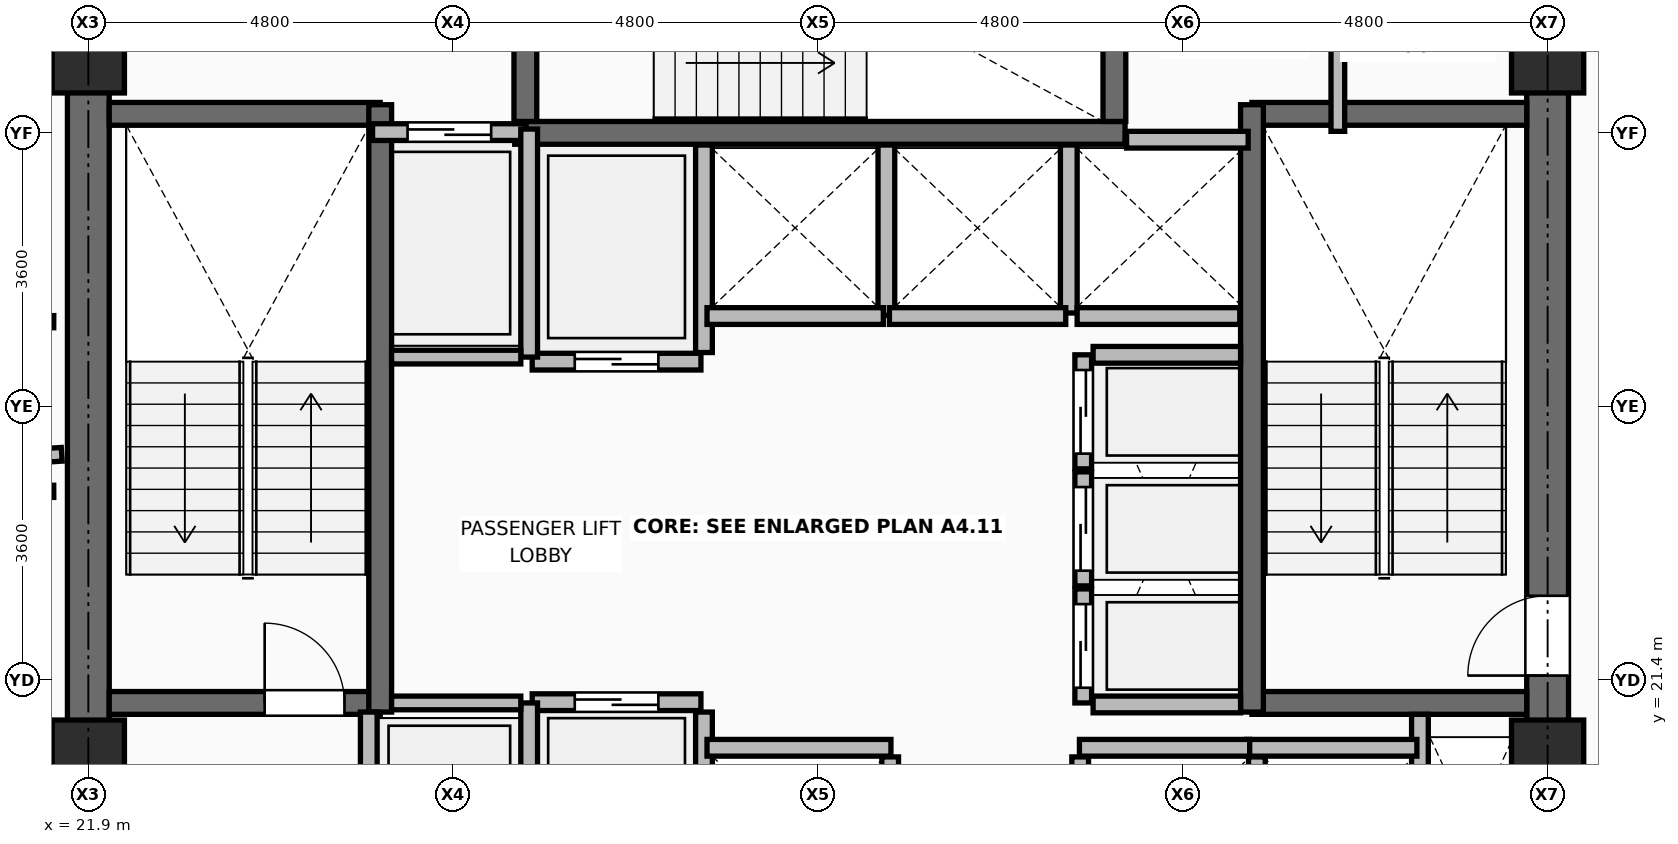
"""IFC4 building model, lengths in metres.
Left out: names, types, materials, properties, quantities, classifications, styles, units other than length and angle.
Written with IfcOpenShell. Run it as: python <this file> out.ifc"""

import sys

from ifc_helpers import new_model, si_unit, direction, frame, frame_2d, origin, origin_2d, place, context, subcontext, project, spatial, rectangle, extrude, element, fill, save


model = new_model("IFC4")
c1 = context("Model", 3, precision=1e-05, world=origin(), true_north=direction((0.0, 1.0)))
c2 = subcontext(c1, "Body", "Model", "MODEL_VIEW")
j1 = project(units=[si_unit("LENGTHUNIT", "METRE"), si_unit("PLANEANGLEUNIT", "RADIAN")], contexts=[c1])
p1 = place(None, origin())
s1 = spatial("IfcSite", under=j1, at=p1, CompositionType="ELEMENT")
p2 = place(p1, origin())
s2 = spatial("IfcBuilding", under=s1, at=p2, CompositionType="ELEMENT")
p3 = place(p2, frame((0.0, 0.0, 153.45)))
s3 = spatial("IfcBuildingStorey", under=s2, at=p3, CompositionType="ELEMENT", Elevation=153.45)
for number, where, z_axis, x_axis in (
    (1, (21.9, 20.4, 0.0), (0.0, 0.0, 1.0), (1.0, 0.0, 0.0)),
    (2, (21.9, 29.6, 0.0), (0.0, 0.0, 1.0), (1.0, 0.0, 0.0)),
    (3, (41.1, 20.4, 0.0), (0.0, 0.0, 1.0), (1.0, 0.0, 0.0)),
    (4, (41.1, 29.6, 0.0), (0.0, 0.0, 1.0), (1.0, 0.0, 0.0)),
):
    element("IfcColumn", number, at=place(p3, frame(where, z_axis=z_axis, x_axis=x_axis)), inside=s3, PredefinedType="COLUMN", context=c2, shape_type="SweptSolid", body=[
        extrude(rectangle(XDim=0.95, YDim=0.95, at=origin_2d()), origin(), (0.0, 0.0, 1.0), 3.75),
    ])
p4 = place(p3, frame((30.0, 18.08, 0.0), z_axis=(0.0, 0.0, 1.0), x_axis=(0.0, 1.0, 0.0)))
e5 = element("IfcWall", 5, at=p4, inside=s3, PredefinedType="PARTITIONING", context=c2, shape_type="SweptSolid", body=[
    extrude(rectangle(XDim=2.9, YDim=0.22, at=frame_2d((1.45, 0.0))), origin(), (0.0, 0.0, 1.0), 3.545),
])
for number, where, z_axis, x_axis in (
    (6, (32.45, 17.92, 0.0), (0.0, 0.0, 1.0), (0.0, 1.0, 0.0)),
    (7, (34.95, 17.92, 0.0), (0.0, 0.0, 1.0), (0.0, 1.0, 0.0)),
):
    element("IfcWall", number, at=place(p3, frame(where, z_axis=z_axis, x_axis=x_axis)), inside=s3, PredefinedType="PARTITIONING", context=c2, shape_type="SweptSolid", body=[
        extrude(rectangle(XDim=2.47, YDim=0.22, at=frame_2d((1.235, 0.0))), origin(), (0.0, 0.0, 1.0), 3.006),
    ])
p5 = place(p3, frame((37.275, 18.08, 0.0), z_axis=(0.0, 0.0, 1.0), x_axis=(0.0, 1.0, 0.0)))
e8 = element("IfcWall", 8, at=p5, inside=s3, PredefinedType="PARTITIONING", context=c2, shape_type="SweptSolid", body=[
    extrude(rectangle(XDim=2.31, YDim=0.22, at=frame_2d((1.155, 0.0))), origin(), (0.0, 0.0, 1.0), 3.545),
])
p6 = place(p3, frame((30.0, 25.71, 0.0), z_axis=(0.0, 0.0, 1.0), x_axis=(0.0, 1.0, 0.0)))
e9 = element("IfcWall", 9, at=p6, inside=s3, PredefinedType="PARTITIONING", context=c2, shape_type="SweptSolid", body=[
    extrude(rectangle(XDim=2.73, YDim=0.22, at=frame_2d((1.365, 0.0))), origin(), (0.0, 0.0, 1.0), 3.545),
])
p7 = place(p3, frame((32.4, 26.2, 0.0), z_axis=(0.0, 0.0, 1.0), x_axis=(0.0, 1.0, 0.0)))
e10 = element("IfcWall", 10, at=p7, inside=s3, PredefinedType="PARTITIONING", context=c2, shape_type="SweptSolid", body=[
    extrude(rectangle(XDim=2.24, YDim=0.22, at=frame_2d((1.12, 0.0))), origin(), (0.0, 0.0, 1.0), 3.545),
])
p8 = place(p3, frame((34.8, 26.23, 0.0), z_axis=(0.0, 0.0, 1.0), x_axis=(0.0, 1.0, 0.0)))
e11 = element("IfcWall", 11, at=p8, inside=s3, PredefinedType="PARTITIONING", context=c2, shape_type="SweptSolid", body=[
    extrude(rectangle(XDim=2.21, YDim=0.22, at=frame_2d((1.105, 0.0))), origin(), (0.0, 0.0, 1.0), 3.545),
])
p9 = place(p3, frame((34.91, 26.19, 0.0), z_axis=(0.0, 0.0, 1.0), x_axis=(1.0, 0.0, 0.0)))
e12 = element("IfcWall", 12, at=p9, inside=s3, PredefinedType="PARTITIONING", context=c2, shape_type="SweptSolid", body=[
    extrude(rectangle(XDim=2.14, YDim=0.22, at=frame_2d((1.07, 0.0))), origin(), (0.0, 0.0, 1.0), 3.545),
])
p10 = place(p3, frame((21.9, 18.075, 0.0), z_axis=(0.0, 0.0, 1.0), x_axis=(0.0, 1.0, 0.0)))
e13 = element("IfcWall", 13, at=p10, inside=s3, PredefinedType="SHEAR", context=c2, shape_type="SweptSolid", body=[
    extrude(rectangle(XDim=14.1, YDim=0.55, at=frame_2d((7.05, 0.0))), origin(), (0.0, 0.0, 1.0), 3.57),
])
p11 = place(p3, frame((41.1, 18.075, 0.0), z_axis=(0.0, 0.0, 1.0), x_axis=(0.0, 1.0, 0.0)))
e14 = element("IfcWall", 14, at=p11, inside=s3, PredefinedType="SHEAR", context=c2, shape_type="SweptSolid", body=[
    extrude(rectangle(XDim=14.1, YDim=0.55, at=frame_2d((7.05, 0.0))), origin(), (0.0, 0.0, 1.0), 3.57),
])
p12 = place(p11, frame((3.385, 0.0, 0.0)))
e15 = element("IfcOpeningElement", 15, at=p12, cuts=e14, PredefinedType="OPENING", context=c2, shape_type="SweptSolid", body=[
    extrude(rectangle(XDim=1.05, YDim=2.1, at=frame_2d((0.525, 1.05))), frame((0.0, 0.285, 0.0), z_axis=(0.0, -1.0, 0.0), x_axis=(1.0, 0.0, 0.0)), (0.0, 0.0, 1.0), 0.57),
])
p13 = place(p3, frame((22.175, 21.1, 0.0), z_axis=(0.0, 0.0, 1.0), x_axis=(1.0, 0.0, 0.0)))
e16 = element("IfcWall", 16, at=p13, inside=s3, PredefinedType="SHEAR", context=c2, shape_type="SweptSolid", body=[
    extrude(rectangle(XDim=3.565, YDim=0.3, at=frame_2d((1.782, 0.0))), origin(), (0.0, 0.0, 1.0), 3.57),
])
p14 = place(p13, frame((2.045, 0.0, 0.0)))
e17 = element("IfcOpeningElement", 17, at=p14, cuts=e16, PredefinedType="OPENING", context=c2, shape_type="SweptSolid", body=[
    extrude(rectangle(XDim=1.05, YDim=2.1, at=frame_2d((0.525, 1.05))), frame((0.0, 0.16, 0.0), z_axis=(0.0, -1.0, 0.0), x_axis=(1.0, 0.0, 0.0)), (0.0, 0.0, 1.0), 0.32),
])
p15 = place(p3, frame((22.175, 28.85, 0.0), z_axis=(0.0, 0.0, 1.0), x_axis=(1.0, 0.0, 0.0)))
e18 = element("IfcWall", 18, at=p15, inside=s3, PredefinedType="SHEAR", context=c2, shape_type="SweptSolid", body=[
    extrude(rectangle(XDim=3.565, YDim=0.3, at=frame_2d((1.782, 0.0))), origin(), (0.0, 0.0, 1.0), 3.57),
])
p16 = place(p3, frame((25.74, 20.98, 0.0), z_axis=(0.0, 0.0, 1.0), x_axis=(0.0, 1.0, 0.0)))
e19 = element("IfcWall", 19, at=p16, inside=s3, PredefinedType="SHEAR", context=c2, shape_type="SweptSolid", body=[
    extrude(rectangle(XDim=7.99, YDim=0.3, at=frame_2d((3.995, 0.0))), origin(), (0.0, 0.0, 1.0), 3.57),
])
for number, where, z_axis, x_axis in (
    (20, (37.21, 21.1, 0.0), (0.0, 0.0, 1.0), (1.0, 0.0, 0.0)),
    (21, (37.21, 28.85, 0.0), (0.0, 0.0, 1.0), (1.0, 0.0, 0.0)),
):
    element("IfcWall", number, at=place(p3, frame(where, z_axis=z_axis, x_axis=x_axis)), inside=s3, PredefinedType="SHEAR", context=c2, shape_type="SweptSolid", body=[
        extrude(rectangle(XDim=3.615, YDim=0.3, at=frame_2d((1.808, 0.0))), origin(), (0.0, 0.0, 1.0), 3.57),
    ])
p17 = place(p3, frame((37.21, 20.98, 0.0), z_axis=(0.0, 0.0, 1.0), x_axis=(0.0, 1.0, 0.0)))
e22 = element("IfcWall", 22, at=p17, inside=s3, PredefinedType="SHEAR", context=c2, shape_type="SweptSolid", body=[
    extrude(rectangle(XDim=7.99, YDim=0.3, at=frame_2d((3.995, 0.0))), origin(), (0.0, 0.0, 1.0), 3.57),
])
p18 = place(p3, frame((27.51, 28.6, 0.0), z_axis=(0.0, 0.0, 1.0), x_axis=(1.0, 0.0, 0.0)))
e23 = element("IfcWall", 23, at=p18, inside=s3, PredefinedType="SHEAR", context=c2, shape_type="SweptSolid", body=[
    extrude(rectangle(XDim=8.03, YDim=0.3, at=frame_2d((4.015, 0.0))), origin(), (0.0, 0.0, 1.0), 3.57),
])
p19 = place(p3, frame((27.65, 28.75, 0.0), z_axis=(0.0, 0.0, 1.0), x_axis=(0.0, 1.0, 0.0)))
e24 = element("IfcWall", 24, at=p19, inside=s3, PredefinedType="SHEAR", context=c2, shape_type="SweptSolid", body=[
    extrude(rectangle(XDim=3.425, YDim=0.3, at=frame_2d((1.712, 0.0))), origin(), (0.0, 0.0, 1.0), 3.57),
])
p20 = place(p19, frame((1.0, 0.0, 0.0)))
e25 = element("IfcOpeningElement", 25, at=p20, cuts=e24, PredefinedType="OPENING", context=c2, shape_type="SweptSolid", body=[
    extrude(rectangle(XDim=1.05, YDim=2.1, at=frame_2d((0.525, 1.05))), frame((0.0, 0.16, 0.0), z_axis=(0.0, -1.0, 0.0), x_axis=(1.0, 0.0, 0.0)), (0.0, 0.0, 1.0), 0.32),
])
p21 = place(p3, frame((35.4, 28.75, 0.0), z_axis=(0.0, 0.0, 1.0), x_axis=(0.0, 1.0, 0.0)))
e26 = element("IfcWall", 26, at=p21, inside=s3, PredefinedType="SHEAR", context=c2, shape_type="SweptSolid", body=[
    extrude(rectangle(XDim=3.425, YDim=0.3, at=frame_2d((1.712, 0.0))), origin(), (0.0, 0.0, 1.0), 3.57),
])
p22 = place(p3, frame((39.42, 18.075, 0.0), z_axis=(0.0, 0.0, 1.0), x_axis=(0.0, 1.0, 0.0)))
e27 = element("IfcWall", 27, at=p22, inside=s3, PredefinedType="PARTITIONING", context=c2, shape_type="SweptSolid", body=[
    extrude(rectangle(XDim=2.875, YDim=0.22, at=frame_2d((1.438, 0.0))), origin(), (0.0, 0.0, 1.0), 3.55),
])
p23 = place(p3, frame((25.59, 18.22, 0.0), z_axis=(0.0, 0.0, 1.0), x_axis=(0.0, 1.0, 0.0)))
e28 = element("IfcWall", 28, at=p23, inside=s3, PredefinedType="PARTITIONING", context=c2, shape_type="SweptSolid", body=[
    extrude(rectangle(XDim=2.76, YDim=0.22, at=frame_2d((1.38, 0.0))), origin(), (0.0, 0.0, 1.0), 3.55),
])
p24 = place(p23, frame((0.83, 0.0, 0.0)))
e29 = element("IfcOpeningElement", 29, at=p24, cuts=e28, PredefinedType="OPENING", context=c2, shape_type="SweptSolid", body=[
    extrude(rectangle(XDim=1.1, YDim=2.2, at=frame_2d((0.55, 1.1))), frame((0.0, 0.12, 0.0), z_axis=(0.0, -1.0, 0.0), x_axis=(1.0, 0.0, 0.0)), (0.0, 0.0, 1.0), 0.24),
])
p25 = place(p3, frame((25.64, 28.61, 0.0), z_axis=(0.0, 0.0, 1.0), x_axis=(1.0, 0.0, 0.0)))
e30 = element("IfcWall", 30, at=p25, inside=s3, PredefinedType="PARTITIONING", context=c2, shape_type="SweptSolid", body=[
    extrude(rectangle(XDim=2.02, YDim=0.22, at=frame_2d((1.01, 0.0))), origin(), (0.0, 0.0, 1.0), 3.55),
])
p26 = place(p25, frame((0.46, 0.0, 0.0)))
e31 = element("IfcOpeningElement", 31, at=p26, cuts=e30, PredefinedType="OPENING", context=c2, shape_type="SweptSolid", body=[
    extrude(rectangle(XDim=1.1, YDim=2.2, at=frame_2d((0.55, 1.1))), frame((0.0, 0.12, 0.0), z_axis=(0.0, -1.0, 0.0), x_axis=(1.0, 0.0, 0.0)), (0.0, 0.0, 1.0), 0.24),
])
p27 = place(p3, frame((27.74, 21.11, 0.0), z_axis=(0.0, 0.0, 1.0), x_axis=(1.0, 0.0, 0.0)))
e32 = element("IfcWall", 32, at=p27, inside=s3, PredefinedType="PARTITIONING", context=c2, shape_type="SweptSolid", body=[
    extrude(rectangle(XDim=2.22, YDim=0.22, at=frame_2d((1.11, 0.0))), origin(), (0.0, 0.0, 1.0), 3.55),
])
p28 = place(p27, frame((0.56, 0.0, 0.0)))
e33 = element("IfcOpeningElement", 33, at=p28, cuts=e32, PredefinedType="OPENING", context=c2, shape_type="SweptSolid", body=[
    extrude(rectangle(XDim=1.1, YDim=2.2, at=frame_2d((0.55, 1.1))), frame((0.0, 0.12, 0.0), z_axis=(0.0, -1.0, 0.0), x_axis=(1.0, 0.0, 0.0)), (0.0, 0.0, 1.0), 0.24),
])
p29 = place(p3, frame((27.74, 25.59, 0.0), z_axis=(0.0, 0.0, 1.0), x_axis=(1.0, 0.0, 0.0)))
e34 = element("IfcWall", 34, at=p29, inside=s3, PredefinedType="PARTITIONING", context=c2, shape_type="SweptSolid", body=[
    extrude(rectangle(XDim=2.22, YDim=0.22, at=frame_2d((1.11, 0.0))), origin(), (0.0, 0.0, 1.0), 3.55),
])
p30 = place(p29, frame((0.56, 0.0, 0.0)))
e35 = element("IfcOpeningElement", 35, at=p30, cuts=e34, PredefinedType="OPENING", context=c2, shape_type="SweptSolid", body=[
    extrude(rectangle(XDim=1.1, YDim=2.2, at=frame_2d((0.55, 1.1))), frame((0.0, 0.12, 0.0), z_axis=(0.0, -1.0, 0.0), x_axis=(1.0, 0.0, 0.0)), (0.0, 0.0, 1.0), 0.24),
])
p31 = place(p3, frame((30.04, 20.51, 0.0), z_axis=(0.0, 0.0, 1.0), x_axis=(1.0, 0.0, 0.0)))
e36 = element("IfcWall", 36, at=p31, inside=s3, PredefinedType="PARTITIONING", context=c2, shape_type="SweptSolid", body=[
    extrude(rectangle(XDim=2.42, YDim=0.22, at=frame_2d((1.21, 0.0))), origin(), (0.0, 0.0, 1.0), 3.55),
])
for number, where, z_axis, x_axis in (
    (37, (37.14, 20.51, 0.0), (0.0, 0.0, 1.0), (1.0, 0.0, 0.0)),
    (38, (34.94, 20.51, 0.0), (0.0, 0.0, 1.0), (1.0, 0.0, 0.0)),
):
    element("IfcWall", number, at=place(p3, frame(where, z_axis=z_axis, x_axis=x_axis)), inside=s3, PredefinedType="PARTITIONING", context=c2, shape_type="SweptSolid", body=[
        extrude(rectangle(XDim=2.24, YDim=0.22, at=frame_2d((1.12, 0.0))), origin(), (0.0, 0.0, 1.0), 3.55),
    ])
for number, where, z_axis, x_axis in (
    (39, (30.04, 26.19, 0.0), (0.0, 0.0, 1.0), (1.0, 0.0, 0.0)),
    (40, (32.44, 26.19, 0.0), (0.0, 0.0, 1.0), (1.0, 0.0, 0.0)),
):
    element("IfcWall", number, at=place(p3, frame(where, z_axis=z_axis, x_axis=x_axis)), inside=s3, PredefinedType="PARTITIONING", context=c2, shape_type="SweptSolid", body=[
        extrude(rectangle(XDim=2.32, YDim=0.22, at=frame_2d((1.16, 0.0))), origin(), (0.0, 0.0, 1.0), 3.55),
    ])
p32 = place(p3, frame((35.56, 28.51, 0.0), z_axis=(0.0, 0.0, 1.0), x_axis=(1.0, 0.0, 0.0)))
e41 = element("IfcWall", 41, at=p32, inside=s3, PredefinedType="PARTITIONING", context=c2, shape_type="SweptSolid", body=[
    extrude(rectangle(XDim=1.6, YDim=0.22, at=frame_2d((0.8, 0.0))), origin(), (0.0, 0.0, 1.0), 3.55),
])
p33 = place(p3, frame((34.99, 21.1, 0.0), z_axis=(0.0, 0.0, 1.0), x_axis=(0.0, 1.0, 0.0)))
e42 = element("IfcWall", 42, at=p33, inside=s3, PredefinedType="PARTITIONING", context=c2, shape_type="SweptSolid", body=[
    extrude(rectangle(XDim=1.5, YDim=0.22, at=frame_2d((0.75, 0.0))), origin(), (0.0, 0.0, 1.0), 3.55),
])
p34 = place(p33, frame((0.2, 0.0, 0.0)))
e43 = element("IfcOpeningElement", 43, at=p34, cuts=e42, PredefinedType="OPENING", context=c2, shape_type="SweptSolid", body=[
    extrude(rectangle(XDim=1.1, YDim=2.2, at=frame_2d((0.55, 1.1))), frame((0.0, 0.12, 0.0), z_axis=(0.0, -1.0, 0.0), x_axis=(1.0, 0.0, 0.0)), (0.0, 0.0, 1.0), 0.24),
])
p35 = place(p3, frame((34.99, 22.64, 0.0), z_axis=(0.0, 0.0, 1.0), x_axis=(0.0, 1.0, 0.0)))
e44 = element("IfcWall", 44, at=p35, inside=s3, PredefinedType="PARTITIONING", context=c2, shape_type="SweptSolid", body=[
    extrude(rectangle(XDim=1.5, YDim=0.22, at=frame_2d((0.75, 0.0))), origin(), (0.0, 0.0, 1.0), 3.55),
])
p36 = place(p35, frame((0.2, 0.0, 0.0)))
e45 = element("IfcOpeningElement", 45, at=p36, cuts=e44, PredefinedType="OPENING", context=c2, shape_type="SweptSolid", body=[
    extrude(rectangle(XDim=1.1, YDim=2.2, at=frame_2d((0.55, 1.1))), frame((0.0, 0.12, 0.0), z_axis=(0.0, -1.0, 0.0), x_axis=(1.0, 0.0, 0.0)), (0.0, 0.0, 1.0), 0.24),
])
p37 = place(p3, frame((34.99, 24.18, 0.0), z_axis=(0.0, 0.0, 1.0), x_axis=(0.0, 1.0, 0.0)))
e46 = element("IfcWall", 46, at=p37, inside=s3, PredefinedType="PARTITIONING", context=c2, shape_type="SweptSolid", body=[
    extrude(rectangle(XDim=1.5, YDim=0.22, at=frame_2d((0.75, 0.0))), origin(), (0.0, 0.0, 1.0), 3.55),
])
p38 = place(p37, frame((0.2, 0.0, 0.0)))
e47 = element("IfcOpeningElement", 47, at=p38, cuts=e46, PredefinedType="OPENING", context=c2, shape_type="SweptSolid", body=[
    extrude(rectangle(XDim=1.1, YDim=2.2, at=frame_2d((0.55, 1.1))), frame((0.0, 0.12, 0.0), z_axis=(0.0, -1.0, 0.0), x_axis=(1.0, 0.0, 0.0)), (0.0, 0.0, 1.0), 0.24),
])
p39 = place(p3, frame((27.7, 18.15, 0.0), z_axis=(0.0, 0.0, 1.0), x_axis=(0.0, 1.0, 0.0)))
e48 = element("IfcWall", 48, at=p39, inside=s3, PredefinedType="PARTITIONING", context=c2, shape_type="SweptSolid", body=[
    extrude(rectangle(XDim=2.95, YDim=0.22, at=frame_2d((1.475, 0.0))), origin(), (0.0, 0.0, 1.0), 3.55),
])
p40 = place(p3, frame((27.7, 25.65, 0.0), z_axis=(0.0, 0.0, 1.0), x_axis=(0.0, 1.0, 0.0)))
e49 = element("IfcWall", 49, at=p40, inside=s3, PredefinedType="PARTITIONING", context=c2, shape_type="SweptSolid", body=[
    extrude(rectangle(XDim=3.0, YDim=0.22, at=frame_2d((1.5, 0.0))), origin(), (0.0, 0.0, 1.0), 3.55),
])
for number, where, z_axis, x_axis in (
    (50, (35.12, 21.08, 0.0), (0.0, 0.0, 1.0), (1.0, 0.0, 0.0)),
    (51, (35.12, 25.68, 0.0), (0.0, 0.0, 1.0), (1.0, 0.0, 0.0)),
):
    element("IfcWall", number, at=place(p3, frame(where, z_axis=z_axis, x_axis=x_axis)), inside=s3, PredefinedType="PARTITIONING", context=c2, shape_type="SweptSolid", body=[
        extrude(rectangle(XDim=1.94, YDim=0.22, at=frame_2d((0.97, 0.0))), origin(), (0.0, 0.0, 1.0), 3.55),
    ])
for number, where, z_axis, x_axis in (
    (52, (25.89, 21.1, 0.0), (0.0, 0.0, 1.0), (1.0, 0.0, 0.0)),
    (53, (25.89, 25.65, 0.0), (0.0, 0.0, 1.0), (1.0, 0.0, 0.0)),
):
    element("IfcWall", number, at=place(p3, frame(where, z_axis=z_axis, x_axis=x_axis)), inside=s3, PredefinedType="PARTITIONING", context=c2, shape_type="SweptSolid", body=[
        extrude(rectangle(XDim=1.7, YDim=0.18, at=frame_2d((0.85, 0.0))), origin(), (0.0, 0.0, 1.0), 3.55),
    ])
p41 = place(p3, frame((38.34, 28.62, 0.0), z_axis=(0.0, 0.0, 1.0), x_axis=(0.0, 1.0, 0.0)))
e54 = element("IfcWall", 54, at=p41, inside=s3, PredefinedType="PARTITIONING", context=c2, shape_type="SweptSolid", body=[
    extrude(rectangle(XDim=3.555, YDim=0.18, at=frame_2d((1.777, 0.0))), origin(), (0.0, 0.0, 1.0), 3.55),
])
p42 = place(p3, frame((21.445, 26.116, 0.0), z_axis=(0.0, 0.0, 1.0), x_axis=(-0.999981878077, 0.006020258873, 0.0)))
e55 = element("IfcWall", 55, at=p42, inside=s3, PredefinedType="PARTITIONING", context=c2, shape_type="SweptSolid", body=[
    extrude(rectangle(XDim=4.339, YDim=0.16, at=frame_2d((2.169, 0.0))), origin(), (0.0, 0.0, 1.0), 2.595),
])
p43 = place(p42, frame((0.16, 0.0, 0.0)))
e56 = element("IfcOpeningElement", 56, at=p43, cuts=e55, PredefinedType="OPENING", context=c2, shape_type="SweptSolid", body=[
    extrude(rectangle(XDim=1.0, YDim=2.1, at=frame_2d((0.5, 1.05))), frame((0.0, 0.09, 0.0), z_axis=(0.0, -1.0, 0.0), x_axis=(1.0, 0.0, 0.0)), (0.0, 0.0, 1.0), 0.18),
])
p44 = place(p3, frame((17.106, 23.858, 0.0), z_axis=(0.0, 0.0, 1.0), x_axis=(0.999981878077, 0.006020258873, 0.0)))
e57 = element("IfcWall", 57, at=p44, inside=s3, PredefinedType="PARTITIONING", context=c2, shape_type="SweptSolid", body=[
    extrude(rectangle(XDim=4.339, YDim=0.16, at=frame_2d((2.169, 0.0))), origin(), (0.0, 0.0, 1.0), 2.595),
])
p45 = place(p3, frame((21.55, 24.371, 0.0), z_axis=(0.0, 0.0, 1.0), x_axis=(-0.998004655197, -0.063140384899, 0.0)))
e58 = element("IfcWall", 58, at=p45, inside=s3, PredefinedType="PARTITIONING", context=c2, shape_type="SweptSolid", body=[
    extrude(rectangle(XDim=15.157, YDim=0.18, at=frame_2d((7.579, 0.0))), origin(), (0.0, 0.0, 1.0), 2.595),
])
p46 = place(p14, origin())
e59 = element("IfcDoor", 59, at=p46, inside=s3, OperationType="SINGLE_SWING_LEFT", PredefinedType="DOOR", context=c2, shape_type="SweptSolid", body=[
    extrude(rectangle(XDim=1.05, YDim=2.1, at=frame_2d((0.525, 1.05))), frame((0.0, 0.025, 0.0), z_axis=(0.0, -1.0, 0.0), x_axis=(1.0, 0.0, 0.0)), (0.0, 0.0, 1.0), 0.05),
])
fill(e17, e59)
p47 = place(p12, origin())
e60 = element("IfcDoor", 60, at=p47, inside=s3, OperationType="SINGLE_SWING_LEFT", PredefinedType="DOOR", context=c2, shape_type="SweptSolid", body=[
    extrude(rectangle(XDim=1.05, YDim=2.1, at=frame_2d((0.525, 1.05))), frame((0.0, 0.025, 0.0), z_axis=(0.0, -1.0, 0.0), x_axis=(1.0, 0.0, 0.0)), (0.0, 0.0, 1.0), 0.05),
])
fill(e15, e60)
p48 = place(p26, origin())
e61 = element("IfcDoor", 61, at=p48, inside=s3, OperationType="DOUBLE_DOOR_SLIDING", PredefinedType="DOOR", context=c2, shape_type="SweptSolid", body=[
    extrude(rectangle(XDim=1.1, YDim=2.2, at=frame_2d((0.55, 1.1))), frame((0.0, 0.025, 0.0), z_axis=(0.0, -1.0, 0.0), x_axis=(1.0, 0.0, 0.0)), (0.0, 0.0, 1.0), 0.05),
])
fill(e31, e61)
p49 = place(p28, origin())
e62 = element("IfcDoor", 62, at=p49, inside=s3, OperationType="DOUBLE_DOOR_SLIDING", PredefinedType="DOOR", context=c2, shape_type="SweptSolid", body=[
    extrude(rectangle(XDim=1.1, YDim=2.2, at=frame_2d((0.55, 1.1))), frame((0.0, 0.025, 0.0), z_axis=(0.0, -1.0, 0.0), x_axis=(1.0, 0.0, 0.0)), (0.0, 0.0, 1.0), 0.05),
])
fill(e33, e62)
p50 = place(p30, frame((1.1, 0.0, 0.0), z_axis=(0.0, 0.0, 1.0), x_axis=(-1.0, 0.0, 0.0)))
e63 = element("IfcDoor", 63, at=p50, inside=s3, OperationType="DOUBLE_DOOR_SLIDING", PredefinedType="DOOR", context=c2, shape_type="SweptSolid", body=[
    extrude(rectangle(XDim=1.1, YDim=2.2, at=frame_2d((0.55, 1.1))), frame((0.0, 0.025, 0.0), z_axis=(0.0, -1.0, 0.0), x_axis=(1.0, 0.0, 0.0)), (0.0, 0.0, 1.0), 0.05),
])
fill(e35, e63)
p51 = place(p34, origin())
e64 = element("IfcDoor", 64, at=p51, inside=s3, OperationType="DOUBLE_DOOR_SLIDING", PredefinedType="DOOR", context=c2, shape_type="SweptSolid", body=[
    extrude(rectangle(XDim=1.1, YDim=2.2, at=frame_2d((0.55, 1.1))), frame((0.0, 0.025, 0.0), z_axis=(0.0, -1.0, 0.0), x_axis=(1.0, 0.0, 0.0)), (0.0, 0.0, 1.0), 0.05),
])
fill(e43, e64)
p52 = place(p36, origin())
e65 = element("IfcDoor", 65, at=p52, inside=s3, OperationType="DOUBLE_DOOR_SLIDING", PredefinedType="DOOR", context=c2, shape_type="SweptSolid", body=[
    extrude(rectangle(XDim=1.1, YDim=2.2, at=frame_2d((0.55, 1.1))), frame((0.0, 0.025, 0.0), z_axis=(0.0, -1.0, 0.0), x_axis=(1.0, 0.0, 0.0)), (0.0, 0.0, 1.0), 0.05),
])
fill(e45, e65)
p53 = place(p38, origin())
e66 = element("IfcDoor", 66, at=p53, inside=s3, OperationType="DOUBLE_DOOR_SLIDING", PredefinedType="DOOR", context=c2, shape_type="SweptSolid", body=[
    extrude(rectangle(XDim=1.1, YDim=2.2, at=frame_2d((0.55, 1.1))), frame((0.0, 0.025, 0.0), z_axis=(0.0, -1.0, 0.0), x_axis=(1.0, 0.0, 0.0)), (0.0, 0.0, 1.0), 0.05),
])
fill(e47, e66)
save(model, sys.argv[1])
